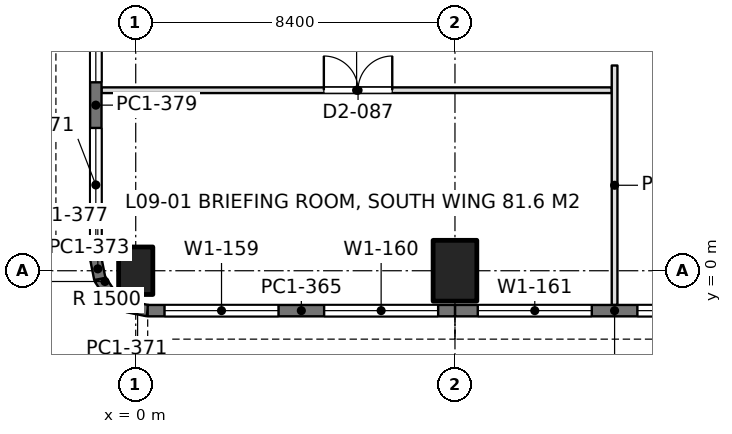
"""IFC4 building model, lengths in metres.
Left out: names, types, materials, properties, quantities, classifications, styles, units other than length and angle.
Written with IfcOpenShell. Run it as: python <this file> out.ifc"""

import sys

from ifc_helpers import new_model, si_unit, direction, frame, frame_2d, origin, origin_with_axes, origin_2d, place, context, subcontext, project, spatial, rectangle, extrude, element, fill, save


model = new_model("IFC4")
c1 = context("Model", 3, precision=1e-05, world=origin(), true_north=direction((0.0, 1.0)))
c2 = subcontext(c1, "Body", "Model", "MODEL_VIEW")
j1 = project(units=[si_unit("LENGTHUNIT", "METRE"), si_unit("PLANEANGLEUNIT", "RADIAN")], contexts=[c1])
p1 = place(None, origin())
s1 = spatial("IfcSite", under=j1, at=p1, CompositionType="ELEMENT")
p2 = place(p1, origin())
s2 = spatial("IfcBuilding", under=s1, at=p2, CompositionType="ELEMENT")
p3 = place(p2, frame((0.0, 0.0, 41.4)))
s3 = spatial("IfcBuildingStorey", under=s2, at=p3, CompositionType="ELEMENT", Elevation=41.4)
p4 = place(p3, origin_with_axes())
e1 = element("IfcColumn", 1, at=p4, inside=s3, PredefinedType="COLUMN", context=c2, shape_type="SweptSolid", body=[
    extrude(rectangle(XDim=0.9, YDim=1.25, at=origin_2d()), origin(), (0.0, 0.0, 1.0), 4.5),
])
p5 = place(p3, frame((8.4, 0.0, 0.0), z_axis=(0.0, 0.0, 1.0), x_axis=(1.0, 0.0, 0.0)))
e2 = element("IfcColumn", 2, at=p5, inside=s3, PredefinedType="COLUMN", context=c2, shape_type="SweptSolid", body=[
    extrude(rectangle(XDim=1.15, YDim=1.6, at=origin_2d()), origin(), (0.0, 0.0, 1.0), 4.5),
])
p6 = place(p3, frame((16.8, -1.05, 0.0), z_axis=(0.0, 0.0, 1.0), x_axis=(-1.0, 0.0, 0.0)))
e3 = element("IfcWall", 3, at=p6, inside=s3, PredefinedType="SOLIDWALL", context=c2, shape_type="SweptSolid", body=[
    extrude(rectangle(XDim=8.4, YDim=0.3, at=frame_2d((4.2, 0.0))), origin(), (0.0, 0.0, 1.0), 4.34),
])
p7 = place(p6, frame((0.6, 0.0, 0.9)))
e4 = element("IfcOpeningElement", 4, at=p7, cuts=e3, PredefinedType="OPENING", context=c2, shape_type="SweptSolid", body=[
    extrude(rectangle(XDim=3.0, YDim=1.9, at=frame_2d((1.5, 0.95))), frame((0.0, 0.16, 0.0), z_axis=(0.0, -1.0, 0.0), x_axis=(1.0, 0.0, 0.0)), (0.0, 0.0, 1.0), 0.32),
])
p8 = place(p6, frame((4.8, 0.0, 0.9)))
e5 = element("IfcOpeningElement", 5, at=p8, cuts=e3, PredefinedType="OPENING", context=c2, shape_type="SweptSolid", body=[
    extrude(rectangle(XDim=3.0, YDim=1.9, at=frame_2d((1.5, 0.95))), frame((0.0, 0.16, 0.0), z_axis=(0.0, -1.0, 0.0), x_axis=(1.0, 0.0, 0.0)), (0.0, 0.0, 1.0), 0.32),
])
p9 = place(p3, frame((8.4, -1.05, 0.0), z_axis=(0.0, 0.0, 1.0), x_axis=(-1.0, 0.0, 0.0)))
e6 = element("IfcWall", 6, at=p9, inside=s3, PredefinedType="SOLIDWALL", context=c2, shape_type="SweptSolid", body=[
    extrude(rectangle(XDim=8.085, YDim=0.3, at=frame_2d((4.042, 0.0))), origin(), (0.0, 0.0, 1.0), 4.34),
])
p10 = place(p9, frame((0.443, 0.0, 0.9)))
e7 = element("IfcOpeningElement", 7, at=p10, cuts=e6, PredefinedType="OPENING", context=c2, shape_type="SweptSolid", body=[
    extrude(rectangle(XDim=3.0, YDim=1.9, at=frame_2d((1.5, 0.95))), frame((0.0, 0.16, 0.0), z_axis=(0.0, -1.0, 0.0), x_axis=(1.0, 0.0, 0.0)), (0.0, 0.0, 1.0), 0.32),
])
p11 = place(p9, frame((4.643, 0.0, 0.9)))
e8 = element("IfcOpeningElement", 8, at=p11, cuts=e6, PredefinedType="OPENING", context=c2, shape_type="SweptSolid", body=[
    extrude(rectangle(XDim=3.0, YDim=1.9, at=frame_2d((1.5, 0.95))), frame((0.0, 0.16, 0.0), z_axis=(0.0, -1.0, 0.0), x_axis=(1.0, 0.0, 0.0)), (0.0, 0.0, 1.0), 0.32),
])
p12 = place(p3, frame((0.315, -1.05, 0.0), z_axis=(0.0, 0.0, 1.0), x_axis=(-0.980788534345, 0.195073962632, 0.0)))
e9 = element("IfcWall", 9, at=p12, inside=s3, PredefinedType="SOLIDWALL", context=c2, shape_type="SweptSolid", body=[
    extrude(rectangle(XDim=0.541, YDim=0.3, at=frame_2d((0.271, 0.0))), origin(), (0.0, 0.0, 1.0), 4.34),
])
for number, where, z_axis, x_axis in (
    (10, (-0.216, -0.945, 0.0), (0.0, 0.0, 1.0), (-0.831, 0.556, 0.0)),
    (11, (-0.653, -0.653, 0.0), (0.0, 0.0, 1.0), (-0.556, 0.831, 0.0)),
):
    element("IfcWall", number, at=place(p3, frame(where, z_axis=z_axis, x_axis=x_axis)), inside=s3, PredefinedType="SOLIDWALL", context=c2, shape_type="SweptSolid", body=[
        extrude(rectangle(XDim=0.526, YDim=0.3, at=frame_2d((0.263, 0.0))), origin(), (0.0, 0.0, 1.0), 4.34),
    ])
p13 = place(p3, frame((-0.945, -0.216, 0.0), z_axis=(0.0, 0.0, 1.0), x_axis=(-0.195073962632, 0.980788534345, 0.0)))
e12 = element("IfcWall", 12, at=p13, inside=s3, PredefinedType="SOLIDWALL", context=c2, shape_type="SweptSolid", body=[
    extrude(rectangle(XDim=0.541, YDim=0.3, at=frame_2d((0.271, 0.0))), origin(), (0.0, 0.0, 1.0), 4.34),
])
p14 = place(p3, frame((-1.05, 0.315, 0.0), z_axis=(0.0, 0.0, 1.0), x_axis=(0.0, 1.0, 0.0)))
e13 = element("IfcWall", 13, at=p14, inside=s3, PredefinedType="SOLIDWALL", context=c2, shape_type="SweptSolid", body=[
    extrude(rectangle(XDim=8.085, YDim=0.3, at=frame_2d((4.042, 0.0))), origin(), (0.0, 0.0, 1.0), 4.34),
])
p15 = place(p14, frame((0.443, 0.0, 0.9)))
e14 = element("IfcOpeningElement", 14, at=p15, cuts=e13, PredefinedType="OPENING", context=c2, shape_type="SweptSolid", body=[
    extrude(rectangle(XDim=3.0, YDim=1.9, at=frame_2d((1.5, 0.95))), frame((0.0, 0.16, 0.0), z_axis=(0.0, -1.0, 0.0), x_axis=(1.0, 0.0, 0.0)), (0.0, 0.0, 1.0), 0.32),
])
p16 = place(p14, frame((4.643, 0.0, 0.9)))
e15 = element("IfcOpeningElement", 15, at=p16, cuts=e13, PredefinedType="OPENING", context=c2, shape_type="SweptSolid", body=[
    extrude(rectangle(XDim=3.0, YDim=1.9, at=frame_2d((1.5, 0.95))), frame((0.0, 0.16, 0.0), z_axis=(0.0, -1.0, 0.0), x_axis=(1.0, 0.0, 0.0)), (0.0, 0.0, 1.0), 0.32),
])
p17 = place(p3, frame((-0.902, 4.75, 0.0), z_axis=(0.0, 0.0, 1.0), x_axis=(1.0, 0.0, 0.0)))
e16 = element("IfcWall", 16, at=p17, inside=s3, PredefinedType="PARTITIONING", context=c2, shape_type="SweptSolid", body=[
    extrude(rectangle(XDim=13.428, YDim=0.15, at=frame_2d((6.714, 0.0))), origin(), (0.0, 0.0, 1.0), 3.74),
])
p18 = place(p17, frame((5.852, 0.0, 0.0)))
e17 = element("IfcOpeningElement", 17, at=p18, cuts=e16, PredefinedType="OPENING", context=c2, shape_type="SweptSolid", body=[
    extrude(rectangle(XDim=1.8, YDim=2.2, at=frame_2d((0.9, 1.1))), frame((0.0, 0.085, 0.0), z_axis=(0.0, -1.0, 0.0), x_axis=(1.0, 0.0, 0.0)), (0.0, 0.0, 1.0), 0.17),
])
p19 = place(p3, frame((12.6, -0.902, 0.0), z_axis=(0.0, 0.0, 1.0), x_axis=(0.0, 1.0, 0.0)))
e18 = element("IfcWall", 18, at=p19, inside=s3, PredefinedType="PARTITIONING", context=c2, shape_type="SweptSolid", body=[
    extrude(rectangle(XDim=6.302, YDim=0.15, at=frame_2d((3.151, 0.0))), origin(), (0.0, 0.0, 1.0), 3.84),
])
p20 = place(p7, origin())
e19 = element("IfcWindow", 19, at=p20, inside=s3, PartitioningType="SINGLE_PANEL", PredefinedType="WINDOW", context=c2, shape_type="SweptSolid", body=[
    extrude(rectangle(XDim=3.0, YDim=1.9, at=frame_2d((1.5, 0.95))), frame((0.0, 0.03, 0.0), z_axis=(0.0, -1.0, 0.0), x_axis=(1.0, 0.0, 0.0)), (0.0, 0.0, 1.0), 0.06),
])
fill(e4, e19)
p21 = place(p8, origin())
e20 = element("IfcWindow", 20, at=p21, inside=s3, PartitioningType="SINGLE_PANEL", PredefinedType="WINDOW", context=c2, shape_type="SweptSolid", body=[
    extrude(rectangle(XDim=3.0, YDim=1.9, at=frame_2d((1.5, 0.95))), frame((0.0, 0.03, 0.0), z_axis=(0.0, -1.0, 0.0), x_axis=(1.0, 0.0, 0.0)), (0.0, 0.0, 1.0), 0.06),
])
fill(e5, e20)
p22 = place(p10, origin())
e21 = element("IfcWindow", 21, at=p22, inside=s3, PartitioningType="SINGLE_PANEL", PredefinedType="WINDOW", context=c2, shape_type="SweptSolid", body=[
    extrude(rectangle(XDim=3.0, YDim=1.9, at=frame_2d((1.5, 0.95))), frame((0.0, 0.03, 0.0), z_axis=(0.0, -1.0, 0.0), x_axis=(1.0, 0.0, 0.0)), (0.0, 0.0, 1.0), 0.06),
])
fill(e7, e21)
p23 = place(p11, origin())
e22 = element("IfcWindow", 22, at=p23, inside=s3, PartitioningType="SINGLE_PANEL", PredefinedType="WINDOW", context=c2, shape_type="SweptSolid", body=[
    extrude(rectangle(XDim=3.0, YDim=1.9, at=frame_2d((1.5, 0.95))), frame((0.0, 0.03, 0.0), z_axis=(0.0, -1.0, 0.0), x_axis=(1.0, 0.0, 0.0)), (0.0, 0.0, 1.0), 0.06),
])
fill(e8, e22)
p24 = place(p15, origin())
e23 = element("IfcWindow", 23, at=p24, inside=s3, PartitioningType="SINGLE_PANEL", PredefinedType="WINDOW", context=c2, shape_type="SweptSolid", body=[
    extrude(rectangle(XDim=3.0, YDim=1.9, at=frame_2d((1.5, 0.95))), frame((0.0, 0.03, 0.0), z_axis=(0.0, -1.0, 0.0), x_axis=(1.0, 0.0, 0.0)), (0.0, 0.0, 1.0), 0.06),
])
fill(e14, e23)
p25 = place(p16, origin())
e24 = element("IfcWindow", 24, at=p25, inside=s3, PartitioningType="SINGLE_PANEL", PredefinedType="WINDOW", context=c2, shape_type="SweptSolid", body=[
    extrude(rectangle(XDim=3.0, YDim=1.9, at=frame_2d((1.5, 0.95))), frame((0.0, 0.03, 0.0), z_axis=(0.0, -1.0, 0.0), x_axis=(1.0, 0.0, 0.0)), (0.0, 0.0, 1.0), 0.06),
])
fill(e15, e24)
p26 = place(p18, origin())
e25 = element("IfcDoor", 25, at=p26, inside=s3, OperationType="DOUBLE_DOOR_SINGLE_SWING", PredefinedType="DOOR", context=c2, shape_type="SweptSolid", body=[
    extrude(rectangle(XDim=1.8, YDim=2.2, at=frame_2d((0.9, 1.1))), frame((0.0, 0.025, 0.0), z_axis=(0.0, -1.0, 0.0), x_axis=(1.0, 0.0, 0.0)), (0.0, 0.0, 1.0), 0.05),
])
fill(e17, e25)
save(model, sys.argv[1])
